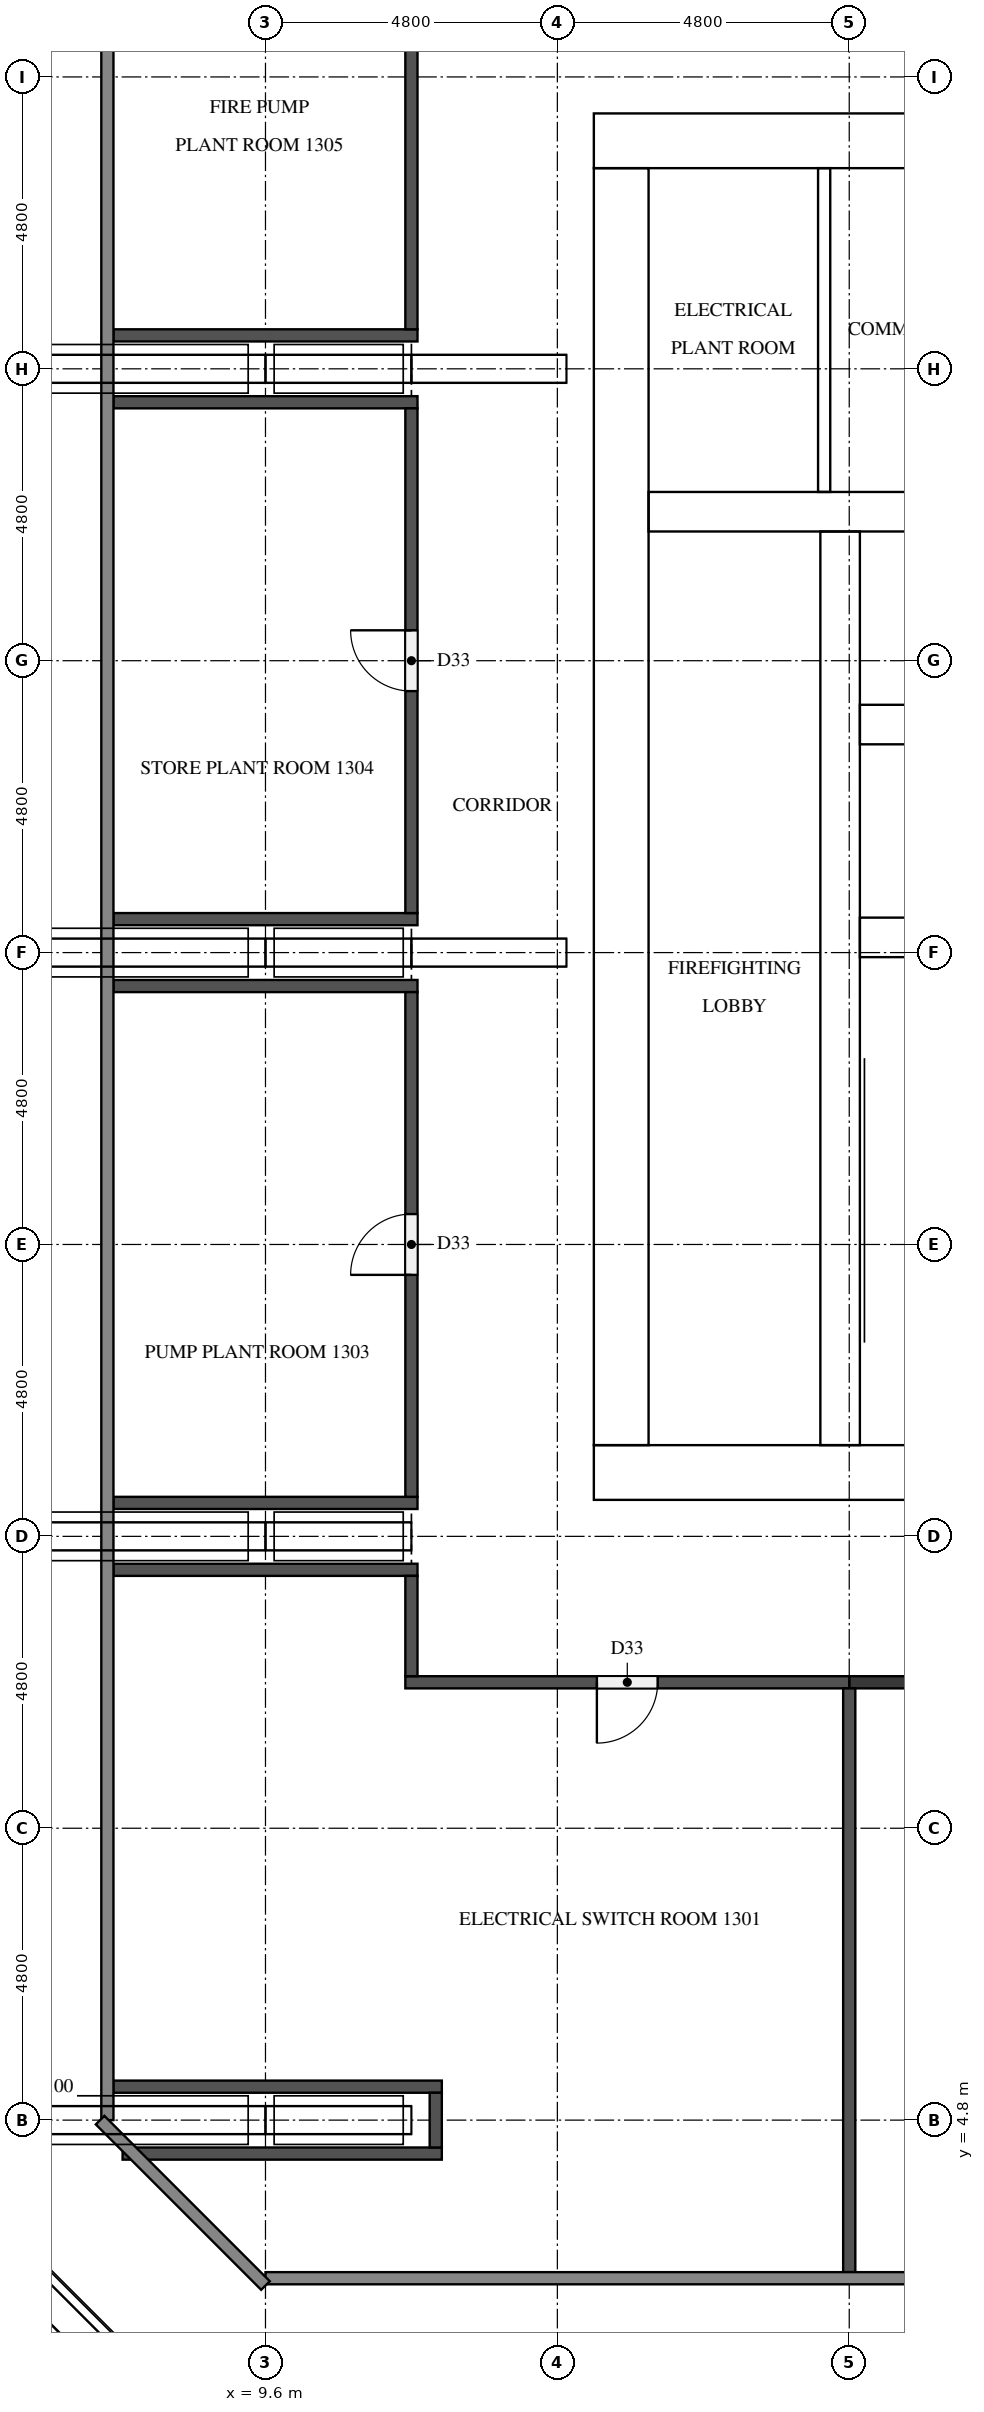
"""IFC4 building model, lengths in metres.
Left out: names, types, materials, properties, quantities, classifications, styles, units other than length and angle.
Written with IfcOpenShell. Run it as: python <this file> out.ifc"""

import sys

from ifc_helpers import new_model, si_unit, direction, frame, frame_2d, origin, place, context, subcontext, project, spatial, rectangle, extrude, element, fill, save


model = new_model("IFC4")
c1 = context("Model", 3, precision=1e-05, world=origin(), true_north=direction((0.0, 1.0)))
c2 = subcontext(c1, "Body", "Model", "MODEL_VIEW")
j1 = project(units=[si_unit("LENGTHUNIT", "METRE"), si_unit("PLANEANGLEUNIT", "RADIAN")], contexts=[c1])
p1 = place(None, origin())
s1 = spatial("IfcSite", under=j1, at=p1, CompositionType="ELEMENT")
p2 = place(p1, origin())
s2 = spatial("IfcBuilding", under=s1, at=p2, CompositionType="ELEMENT")
p3 = place(p2, frame((0.0, 0.0, 53.9)))
s3 = spatial("IfcBuildingStorey", under=s2, at=p3, CompositionType="ELEMENT", Elevation=53.9)
p4 = place(p3, frame((15.0, 15.45, 0.0), z_axis=(0.0, 0.0, 1.0), x_axis=(1.0, 0.0, 0.0)))
e1 = element("IfcWall", 1, at=p4, inside=s3, PredefinedType="SHEAR", context=c2, shape_type="SweptSolid", body=[
    extrude(rectangle(XDim=32.4, YDim=0.9, at=frame_2d((16.2, 0.0))), origin(), (0.0, 0.0, 1.0), 5.1),
])
p5 = place(p4, frame((15.3, 0.0, 0.0)))
e2 = element("IfcOpeningElement", 2, at=p5, cuts=e1, PredefinedType="OPENING", context=c2, shape_type="SweptSolid", body=[
    extrude(rectangle(XDim=1.8, YDim=2.1, at=frame_2d((0.9, 1.05))), frame((0.0, 0.46, 0.0), z_axis=(0.0, -1.0, 0.0), x_axis=(1.0, 0.0, 0.0)), (0.0, 0.0, 1.0), 0.92),
])
p6 = place(p3, frame((15.0, 37.35, 0.0), z_axis=(0.0, 0.0, 1.0), x_axis=(1.0, 0.0, 0.0)))
e3 = element("IfcWall", 3, at=p6, inside=s3, PredefinedType="SHEAR", context=c2, shape_type="SweptSolid", body=[
    extrude(rectangle(XDim=32.4, YDim=0.9, at=frame_2d((16.2, 0.0))), origin(), (0.0, 0.0, 1.0), 5.1),
])
p7 = place(p6, frame((15.3, 0.0, 0.0)))
e4 = element("IfcOpeningElement", 4, at=p7, cuts=e3, PredefinedType="OPENING", context=c2, shape_type="SweptSolid", body=[
    extrude(rectangle(XDim=1.8, YDim=2.1, at=frame_2d((0.9, 1.05))), frame((0.0, 0.46, 0.0), z_axis=(0.0, -1.0, 0.0), x_axis=(1.0, 0.0, 0.0)), (0.0, 0.0, 1.0), 0.92),
])
p8 = place(p6, frame((1.794, 0.0, 0.0)))
e5 = element("IfcOpeningElement", 5, at=p8, cuts=e3, PredefinedType="OPENING", context=c2, shape_type="SweptSolid", body=[
    extrude(rectangle(XDim=1.0, YDim=2.1, at=frame_2d((0.5, 1.05))), frame((0.0, 0.46, 0.0), z_axis=(0.0, -1.0, 0.0), x_axis=(1.0, 0.0, 0.0)), (0.0, 0.0, 1.0), 0.92),
])
p9 = place(p6, frame((5.331, 0.0, 0.0)))
e6 = element("IfcOpeningElement", 6, at=p9, cuts=e3, PredefinedType="OPENING", context=c2, shape_type="SweptSolid", body=[
    extrude(rectangle(XDim=1.0, YDim=2.1, at=frame_2d((0.5, 1.05))), frame((0.0, 0.46, 0.0), z_axis=(0.0, -1.0, 0.0), x_axis=(1.0, 0.0, 0.0)), (0.0, 0.0, 1.0), 0.92),
])
p10 = place(p3, frame((15.45, 15.9, 0.0), z_axis=(0.0, 0.0, 1.0), x_axis=(0.0, 1.0, 0.0)))
e7 = element("IfcWall", 7, at=p10, inside=s3, PredefinedType="SHEAR", context=c2, shape_type="SweptSolid", body=[
    extrude(rectangle(XDim=21.0, YDim=0.9, at=frame_2d((10.5, 0.0))), origin(), (0.0, 0.0, 1.0), 5.1),
])
p11 = place(p10, frame((4.86, 0.0, 0.0)))
e8 = element("IfcOpeningElement", 8, at=p11, cuts=e7, PredefinedType="OPENING", context=c2, shape_type="SweptSolid", body=[
    extrude(rectangle(XDim=1.2, YDim=2.1, at=frame_2d((0.6, 1.05))), frame((0.0, 0.46, 0.0), z_axis=(0.0, -1.0, 0.0), x_axis=(1.0, 0.0, 0.0)), (0.0, 0.0, 1.0), 0.92),
])
p12 = place(p3, frame((19.05, 15.9, 0.0), z_axis=(0.0, 0.0, 1.0), x_axis=(0.0, 1.0, 0.0)))
e9 = element("IfcWall", 9, at=p12, inside=s3, PredefinedType="SHEAR", context=c2, shape_type="SweptSolid", body=[
    extrude(rectangle(XDim=15.025, YDim=0.65, at=frame_2d((7.513, 0.0))), origin(), (0.0, 0.0, 1.0), 5.1),
])
p13 = place(p12, frame((9.55, 0.0, 0.0)))
e10 = element("IfcOpeningElement", 10, at=p13, cuts=e9, PredefinedType="OPENING", context=c2, shape_type="SweptSolid", body=[
    extrude(rectangle(XDim=1.1, YDim=2.1, at=frame_2d((0.55, 1.05))), frame((0.0, 0.335, 0.0), z_axis=(0.0, -1.0, 0.0), x_axis=(1.0, 0.0, 0.0)), (0.0, 0.0, 1.0), 0.67),
])
p14 = place(p12, frame((13.05, 0.0, 0.0)))
e11 = element("IfcOpeningElement", 11, at=p14, cuts=e9, PredefinedType="OPENING", context=c2, shape_type="SweptSolid", body=[
    extrude(rectangle(XDim=1.1, YDim=2.1, at=frame_2d((0.55, 1.05))), frame((0.0, 0.335, 0.0), z_axis=(0.0, -1.0, 0.0), x_axis=(1.0, 0.0, 0.0)), (0.0, 0.0, 1.0), 0.67),
])
p15 = place(p12, frame((0.3, 0.0, 0.0)))
e12 = element("IfcOpeningElement", 12, at=p15, cuts=e9, PredefinedType="OPENING", context=c2, shape_type="SweptSolid", body=[
    extrude(rectangle(XDim=1.2, YDim=2.1, at=frame_2d((0.6, 1.05))), frame((0.0, 0.335, 0.0), z_axis=(0.0, -1.0, 0.0), x_axis=(1.0, 0.0, 0.0)), (0.0, 0.0, 1.0), 0.67),
])
for number, where, z_axis, x_axis in (
    (13, (19.375, 24.25, 0.0), (0.0, 0.0, 1.0), (1.0, 0.0, 0.0)),
    (14, (19.375, 27.75, 0.0), (0.0, 0.0, 1.0), (1.0, 0.0, 0.0)),
):
    element("IfcWall", number, at=place(p3, frame(where, z_axis=z_axis, x_axis=x_axis)), inside=s3, PredefinedType="SHEAR", context=c2, shape_type="SweptSolid", body=[
        extrude(rectangle(XDim=3.4, YDim=0.65, at=frame_2d((1.7, 0.0))), origin(), (0.0, 0.0, 1.0), 5.1),
    ])
p16 = place(p3, frame((15.9, 31.25, 0.0), z_axis=(0.0, 0.0, 1.0), x_axis=(1.0, 0.0, 0.0)))
e15 = element("IfcWall", 15, at=p16, inside=s3, PredefinedType="SHEAR", context=c2, shape_type="SweptSolid", body=[
    extrude(rectangle(XDim=6.875, YDim=0.65, at=frame_2d((3.438, 0.0))), origin(), (0.0, 0.0, 1.0), 5.1),
])
p17 = place(p3, frame((18.788, 31.575, 0.0), z_axis=(0.0, 0.0, 1.0), x_axis=(0.0, 1.0, 0.0)))
e16 = element("IfcWall", 16, at=p17, inside=s3, PredefinedType="PARTITIONING", context=c2, shape_type="SweptSolid", body=[
    extrude(rectangle(XDim=5.325, YDim=0.2, at=frame_2d((2.663, 0.0))), origin(), (0.0, 0.0, 1.0), 5.1),
])
p18 = place(p3, frame((7.25, 4.25, 0.0), z_axis=(0.0, 0.0, 1.0), x_axis=(1.0, 0.0, 0.0)))
e17 = element("IfcWall", 17, at=p18, inside=s3, PredefinedType="PARTITIONING", context=c2, shape_type="SweptSolid", body=[
    extrude(rectangle(XDim=5.25, YDim=0.2, at=frame_2d((2.625, 0.0))), origin(), (0.0, 0.0, 1.0), 5.1),
])
p19 = place(p3, frame((7.1, 5.35, 0.0), z_axis=(0.0, 0.0, 1.0), x_axis=(1.0, 0.0, 0.0)))
e18 = element("IfcWall", 18, at=p19, inside=s3, PredefinedType="PARTITIONING", context=c2, shape_type="SweptSolid", body=[
    extrude(rectangle(XDim=5.4, YDim=0.2, at=frame_2d((2.7, 0.0))), origin(), (0.0, 0.0, 1.0), 5.1),
])
p20 = place(p3, frame((19.2, 12.0, 0.0), z_axis=(0.0, 0.0, 1.0), x_axis=(1.0, 0.0, 0.0)))
e19 = element("IfcWall", 19, at=p20, inside=s3, PredefinedType="PARTITIONING", context=c2, shape_type="SweptSolid", body=[
    extrude(rectangle(XDim=31.3, YDim=0.2, at=frame_2d((15.65, 0.0))), origin(), (0.0, 0.0, 1.0), 5.1),
])
p21 = place(p20, frame((22.95, 0.0, 0.0)))
e20 = element("IfcOpeningElement", 20, at=p21, cuts=e19, PredefinedType="OPENING", context=c2, shape_type="SweptSolid", body=[
    extrude(rectangle(XDim=1.0, YDim=2.1, at=frame_2d((0.5, 1.05))), frame((0.0, 0.11, 0.0), z_axis=(0.0, -1.0, 0.0), x_axis=(1.0, 0.0, 0.0)), (0.0, 0.0, 1.0), 0.22),
])
p22 = place(p20, frame((7.35, 0.0, 0.0)))
e21 = element("IfcOpeningElement", 21, at=p22, cuts=e19, PredefinedType="OPENING", context=c2, shape_type="SweptSolid", body=[
    extrude(rectangle(XDim=1.0, YDim=2.1, at=frame_2d((0.5, 1.05))), frame((0.0, 0.11, 0.0), z_axis=(0.0, -1.0, 0.0), x_axis=(1.0, 0.0, 0.0)), (0.0, 0.0, 1.0), 0.22),
])
p23 = place(p3, frame((19.2, 12.0, 0.0), z_axis=(0.0, 0.0, 1.0), x_axis=(-1.0, 0.0, 0.0)))
e22 = element("IfcWall", 22, at=p23, inside=s3, PredefinedType="PARTITIONING", context=c2, shape_type="SweptSolid", body=[
    extrude(rectangle(XDim=7.3, YDim=0.2, at=frame_2d((3.65, 0.0))), origin(), (0.0, 0.0, 1.0), 5.1),
])
p24 = place(p23, frame((3.15, 0.0, 0.0)))
e23 = element("IfcOpeningElement", 23, at=p24, cuts=e22, PredefinedType="OPENING", context=c2, shape_type="SweptSolid", body=[
    extrude(rectangle(XDim=1.0, YDim=2.1, at=frame_2d((0.5, 1.05))), frame((0.0, 0.11, 0.0), z_axis=(0.0, -1.0, 0.0), x_axis=(1.0, 0.0, 0.0)), (0.0, 0.0, 1.0), 0.22),
])
for number, where, z_axis, x_axis in (
    (24, (7.1, 13.85, 0.0), (0.0, 0.0, 1.0), (1.0, 0.0, 0.0)),
    (25, (7.1, 14.95, 0.0), (0.0, 0.0, 1.0), (1.0, 0.0, 0.0)),
    (26, (7.1, 23.45, 0.0), (0.0, 0.0, 1.0), (1.0, 0.0, 0.0)),
    (27, (7.1, 24.55, 0.0), (0.0, 0.0, 1.0), (1.0, 0.0, 0.0)),
    (28, (7.1, 33.05, 0.0), (0.0, 0.0, 1.0), (1.0, 0.0, 0.0)),
    (29, (7.1, 34.15, 0.0), (0.0, 0.0, 1.0), (1.0, 0.0, 0.0)),
):
    element("IfcWall", number, at=place(p3, frame(where, z_axis=z_axis, x_axis=x_axis)), inside=s3, PredefinedType="PARTITIONING", context=c2, shape_type="SweptSolid", body=[
        extrude(rectangle(XDim=5.0, YDim=0.2, at=frame_2d((2.5, 0.0))), origin(), (0.0, 0.0, 1.0), 5.1),
    ])
p25 = place(p3, frame((12.0, 12.1, 0.0), z_axis=(0.0, 0.0, 1.0), x_axis=(0.0, 1.0, 0.0)))
e30 = element("IfcWall", 30, at=p25, inside=s3, PredefinedType="PARTITIONING", context=c2, shape_type="SweptSolid", body=[
    extrude(rectangle(XDim=1.65, YDim=0.2, at=frame_2d((0.825, 0.0))), origin(), (0.0, 0.0, 1.0), 5.1),
])
p26 = place(p3, frame((12.0, 15.05, 0.0), z_axis=(0.0, 0.0, 1.0), x_axis=(0.0, 1.0, 0.0)))
e31 = element("IfcWall", 31, at=p26, inside=s3, PredefinedType="PARTITIONING", context=c2, shape_type="SweptSolid", body=[
    extrude(rectangle(XDim=8.3, YDim=0.2, at=frame_2d((4.15, 0.0))), origin(), (0.0, 0.0, 1.0), 5.1),
])
p27 = place(p26, frame((3.65, 0.0, 0.0)))
e32 = element("IfcOpeningElement", 32, at=p27, cuts=e31, PredefinedType="OPENING", context=c2, shape_type="SweptSolid", body=[
    extrude(rectangle(XDim=1.0, YDim=2.1, at=frame_2d((0.5, 1.05))), frame((0.0, 0.11, 0.0), z_axis=(0.0, -1.0, 0.0), x_axis=(1.0, 0.0, 0.0)), (0.0, 0.0, 1.0), 0.22),
])
p28 = place(p3, frame((12.0, 24.65, 0.0), z_axis=(0.0, 0.0, 1.0), x_axis=(0.0, 1.0, 0.0)))
e33 = element("IfcWall", 33, at=p28, inside=s3, PredefinedType="PARTITIONING", context=c2, shape_type="SweptSolid", body=[
    extrude(rectangle(XDim=8.3, YDim=0.2, at=frame_2d((4.15, 0.0))), origin(), (0.0, 0.0, 1.0), 5.1),
])
p29 = place(p28, frame((3.65, 0.0, 0.0)))
e34 = element("IfcOpeningElement", 34, at=p29, cuts=e33, PredefinedType="OPENING", context=c2, shape_type="SweptSolid", body=[
    extrude(rectangle(XDim=1.0, YDim=2.1, at=frame_2d((0.5, 1.05))), frame((0.0, 0.11, 0.0), z_axis=(0.0, -1.0, 0.0), x_axis=(1.0, 0.0, 0.0)), (0.0, 0.0, 1.0), 0.22),
])
p30 = place(p3, frame((12.0, 34.25, 0.0), z_axis=(0.0, 0.0, 1.0), x_axis=(0.0, 1.0, 0.0)))
e35 = element("IfcWall", 35, at=p30, inside=s3, PredefinedType="PARTITIONING", context=c2, shape_type="SweptSolid", body=[
    extrude(rectangle(XDim=6.45, YDim=0.2, at=frame_2d((3.225, 0.0))), origin(), (0.0, 0.0, 1.0), 5.1),
])
p31 = place(p3, frame((12.4, 4.35, 0.0), z_axis=(0.0, 0.0, 1.0), x_axis=(0.0, 1.0, 0.0)))
e36 = element("IfcWall", 36, at=p31, inside=s3, PredefinedType="PARTITIONING", context=c2, shape_type="SweptSolid", body=[
    extrude(rectangle(XDim=0.9, YDim=0.2, at=frame_2d((0.45, 0.0))), origin(), (0.0, 0.0, 1.0), 5.1),
])
p32 = place(p3, frame((19.2, 2.3, 0.0), z_axis=(0.0, 0.0, 1.0), x_axis=(0.0, 1.0, 0.0)))
e37 = element("IfcWall", 37, at=p32, inside=s3, PredefinedType="PARTITIONING", context=c2, shape_type="SweptSolid", body=[
    extrude(rectangle(XDim=9.6, YDim=0.2, at=frame_2d((4.8, 0.0))), origin(), (0.0, 0.0, 1.0), 5.1),
])
p33 = place(p13, origin())
e38 = element("IfcDoor", 38, at=p33, inside=s3, OperationType="DOUBLE_DOOR_SLIDING", PredefinedType="DOOR", context=c2, shape_type="SweptSolid", body=[
    extrude(rectangle(XDim=1.1, YDim=2.1, at=frame_2d((0.55, 1.05))), frame((0.0, 0.025, 0.0), z_axis=(0.0, -1.0, 0.0), x_axis=(1.0, 0.0, 0.0)), (0.0, 0.0, 1.0), 0.05),
])
fill(e10, e38)
p34 = place(p14, origin())
e39 = element("IfcDoor", 39, at=p34, inside=s3, OperationType="DOUBLE_DOOR_SLIDING", PredefinedType="DOOR", context=c2, shape_type="SweptSolid", body=[
    extrude(rectangle(XDim=1.1, YDim=2.1, at=frame_2d((0.55, 1.05))), frame((0.0, 0.025, 0.0), z_axis=(0.0, -1.0, 0.0), x_axis=(1.0, 0.0, 0.0)), (0.0, 0.0, 1.0), 0.05),
])
fill(e11, e39)
p35 = place(p15, frame((1.2, 0.0, 0.0), z_axis=(0.0, 0.0, 1.0), x_axis=(-1.0, 0.0, 0.0)))
e40 = element("IfcDoor", 40, at=p35, inside=s3, OperationType="SINGLE_SWING_LEFT", PredefinedType="DOOR", context=c2, shape_type="SweptSolid", body=[
    extrude(rectangle(XDim=1.2, YDim=2.1, at=frame_2d((0.6, 1.05))), frame((0.0, 0.025, 0.0), z_axis=(0.0, -1.0, 0.0), x_axis=(1.0, 0.0, 0.0)), (0.0, 0.0, 1.0), 0.05),
])
fill(e12, e40)
p36 = place(p11, frame((1.2, 0.0, 0.0), z_axis=(0.0, 0.0, 1.0), x_axis=(-1.0, 0.0, 0.0)))
e41 = element("IfcDoor", 41, at=p36, inside=s3, OperationType="SINGLE_SWING_RIGHT", PredefinedType="DOOR", context=c2, shape_type="SweptSolid", body=[
    extrude(rectangle(XDim=1.2, YDim=2.1, at=frame_2d((0.6, 1.05))), frame((0.0, 0.025, 0.0), z_axis=(0.0, -1.0, 0.0), x_axis=(1.0, 0.0, 0.0)), (0.0, 0.0, 1.0), 0.05),
])
fill(e8, e41)
p37 = place(p8, origin())
e42 = element("IfcDoor", 42, at=p37, inside=s3, OperationType="SINGLE_SWING_RIGHT", PredefinedType="DOOR", context=c2, shape_type="SweptSolid", body=[
    extrude(rectangle(XDim=1.0, YDim=2.1, at=frame_2d((0.5, 1.05))), frame((0.0, 0.025, 0.0), z_axis=(0.0, -1.0, 0.0), x_axis=(1.0, 0.0, 0.0)), (0.0, 0.0, 1.0), 0.05),
])
fill(e5, e42)
p38 = place(p24, origin())
e43 = element("IfcDoor", 43, at=p38, inside=s3, OperationType="SINGLE_SWING_RIGHT", PredefinedType="DOOR", context=c2, shape_type="SweptSolid", body=[
    extrude(rectangle(XDim=1.0, YDim=2.1, at=frame_2d((0.5, 1.05))), frame((0.0, 0.025, 0.0), z_axis=(0.0, -1.0, 0.0), x_axis=(1.0, 0.0, 0.0)), (0.0, 0.0, 1.0), 0.05),
])
fill(e23, e43)
p39 = place(p27, origin())
e44 = element("IfcDoor", 44, at=p39, inside=s3, OperationType="SINGLE_SWING_LEFT", PredefinedType="DOOR", context=c2, shape_type="SweptSolid", body=[
    extrude(rectangle(XDim=1.0, YDim=2.1, at=frame_2d((0.5, 1.05))), frame((0.0, 0.025, 0.0), z_axis=(0.0, -1.0, 0.0), x_axis=(1.0, 0.0, 0.0)), (0.0, 0.0, 1.0), 0.05),
])
fill(e32, e44)
p40 = place(p29, origin())
e45 = element("IfcDoor", 45, at=p40, inside=s3, OperationType="SINGLE_SWING_RIGHT", PredefinedType="DOOR", context=c2, shape_type="SweptSolid", body=[
    extrude(rectangle(XDim=1.0, YDim=2.1, at=frame_2d((0.5, 1.05))), frame((0.0, 0.025, 0.0), z_axis=(0.0, -1.0, 0.0), x_axis=(1.0, 0.0, 0.0)), (0.0, 0.0, 1.0), 0.05),
])
fill(e34, e45)
save(model, sys.argv[1])
